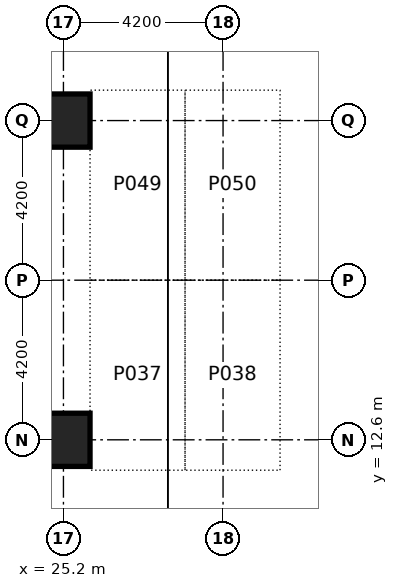
"""IFC4 building model, lengths in metres.
Left out: names, types, materials, properties, quantities, classifications, styles, units other than length and angle.
Written with IfcOpenShell. Run it as: python <this file> out.ifc"""

import sys

from ifc_helpers import new_model, si_unit, direction, frame, origin, origin_2d, place, context, subcontext, project, spatial, rectangle, extrude, element, save


model = new_model("IFC4")
c1 = context("Model", 3, precision=1e-05, world=origin(), true_north=direction((0.0, 1.0)))
c2 = subcontext(c1, "Body", "Model", "MODEL_VIEW")
j1 = project(units=[si_unit("LENGTHUNIT", "METRE"), si_unit("PLANEANGLEUNIT", "RADIAN")], contexts=[c1])
p1 = place(None, origin())
s1 = spatial("IfcSite", under=j1, at=p1, CompositionType="ELEMENT")
p2 = place(p1, origin())
s2 = spatial("IfcBuilding", under=s1, at=p2, CompositionType="ELEMENT")
p3 = place(p2, frame((0.0, 0.0, -8.4)))
s3 = spatial("IfcBuildingStorey", under=s2, at=p3, CompositionType="ELEMENT", Elevation=-8.4)
p4 = place(p3, frame((25.2, 12.6, 0.0), z_axis=(0.0, 0.0, 1.0), x_axis=(1.0, 0.0, 0.0)))
e1 = element("IfcColumn", 1, at=p4, inside=s3, PredefinedType="COLUMN", context=c2, shape_type="SweptSolid", body=[
    extrude(rectangle(XDim=1.4, YDim=1.4, at=origin_2d()), origin(), (0.0, 0.0, 1.0), 3.85),
])
p5 = place(p3, frame((25.2, 21.0, 0.0), z_axis=(0.0, 0.0, 1.0), x_axis=(1.0, 0.0, 0.0)))
e2 = element("IfcColumn", 2, at=p5, inside=s3, PredefinedType="COLUMN", context=c2, shape_type="SweptSolid", body=[
    extrude(rectangle(XDim=1.4, YDim=1.4, at=origin_2d()), origin(), (0.0, 0.0, 1.0), 4.2),
])
save(model, sys.argv[1])
